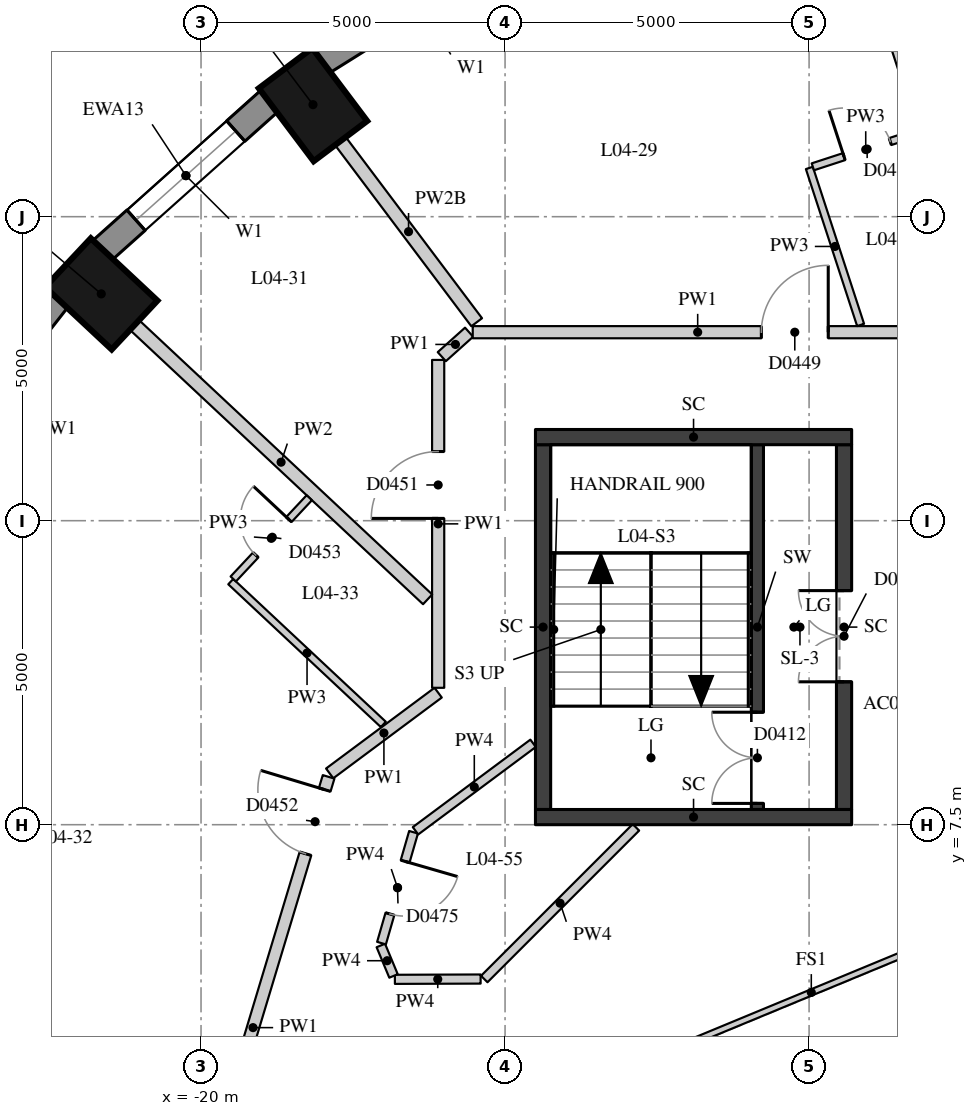
"""IFC4 building model, lengths in metres.
Left out: names, types, materials, properties, quantities, classifications, styles, units other than length and angle.
Written with IfcOpenShell. Run it as: python <this file> out.ifc"""

import sys

from ifc_helpers import new_model, si_unit, direction, frame, frame_2d, origin, origin_2d, place, context, subcontext, project, spatial, rectangle, extrude, element, fill, save


model = new_model("IFC4")
c1 = context("Model", 3, precision=1e-05, world=origin(), true_north=direction((0.0, 1.0)))
c2 = subcontext(c1, "Body", "Model", "MODEL_VIEW")
j1 = project(units=[si_unit("LENGTHUNIT", "METRE"), si_unit("PLANEANGLEUNIT", "RADIAN")], contexts=[c1])
p1 = place(None, origin())
s1 = spatial("IfcSite", under=j1, at=p1, CompositionType="ELEMENT")
p2 = place(p1, origin())
s2 = spatial("IfcBuilding", under=s1, at=p2, CompositionType="ELEMENT")
p3 = place(p2, frame((0.0, 0.0, 21.7)))
s3 = spatial("IfcBuildingStorey", under=s2, at=p3, CompositionType="ELEMENT", Elevation=21.7)
for number, where, z_axis, x_axis in (
    (1, (-18.159, 19.343, 0.0), (0.0, 0.0, 1.0), (-0.601, 0.799, 0.0)),
    (2, (-21.641, 16.23, 0.0), (0.0, 0.0, 1.0), (-0.73, 0.683, 0.0)),
):
    element("IfcColumn", number, at=place(p3, frame(where, z_axis=z_axis, x_axis=x_axis)), inside=s3, PredefinedType="COLUMN", context=c2, shape_type="SweptSolid", body=[
        extrude(rectangle(XDim=1.5, YDim=1.1, at=origin_2d()), origin(), (0.0, 0.0, 1.0), 3.3),
    ])
p4 = place(p3, frame((-14.817, 22.051, 0.0), z_axis=(0.0, 0.0, 1.0), x_axis=(-0.847635480093, -0.530579016629, 0.0)))
e3 = element("IfcWall", 3, at=p4, inside=s3, PredefinedType="SOLIDWALL", context=c2, shape_type="SweptSolid", body=[
    extrude(rectangle(XDim=3.782, YDim=0.45, at=frame_2d((1.891, 0.0))), origin(), (0.0, 0.0, 1.0), 3.02),
])
p5 = place(p4, frame((0.791, 0.0, 0.4)))
e4 = element("IfcOpeningElement", 4, at=p5, cuts=e3, PredefinedType="OPENING", context=c2, shape_type="SweptSolid", body=[
    extrude(rectangle(XDim=2.2, YDim=1.75, at=frame_2d((1.1, 0.875))), frame((0.0, 0.235, 0.0), z_axis=(0.0, -1.0, 0.0), x_axis=(1.0, 0.0, 0.0)), (0.0, 0.0, 1.0), 0.47),
])
p6 = place(p3, frame((-18.871, 19.407, 0.0), z_axis=(0.0, 0.0, 1.0), x_axis=(-0.745526233716, -0.66647628228, 0.0)))
e5 = element("IfcWall", 5, at=p6, inside=s3, PredefinedType="SOLIDWALL", context=c2, shape_type="SweptSolid", body=[
    extrude(rectangle(XDim=3.697, YDim=0.45, at=frame_2d((1.848, 0.0))), origin(), (0.0, 0.0, 1.0), 3.02),
])
p7 = place(p6, frame((0.749, 0.0, 0.4)))
e6 = element("IfcOpeningElement", 6, at=p7, cuts=e5, PredefinedType="OPENING", context=c2, shape_type="SweptSolid", body=[
    extrude(rectangle(XDim=2.2, YDim=1.75, at=frame_2d((1.1, 0.875))), frame((0.0, 0.235, 0.0), z_axis=(0.0, -1.0, 0.0), x_axis=(1.0, 0.0, 0.0)), (0.0, 0.0, 1.0), 0.47),
])
p8 = place(p3, frame((-22.352, 16.17, 0.0), z_axis=(0.0, 0.0, 1.0), x_axis=(-0.616661975264, -0.787228053529, 0.0)))
e7 = element("IfcWall", 7, at=p8, inside=s3, PredefinedType="SOLIDWALL", context=c2, shape_type="SweptSolid", body=[
    extrude(rectangle(XDim=3.61, YDim=0.45, at=frame_2d((1.805, 0.0))), origin(), (0.0, 0.0, 1.0), 3.02),
])
p9 = place(p8, frame((0.705, 0.0, 0.4)))
e8 = element("IfcOpeningElement", 8, at=p9, cuts=e7, PredefinedType="OPENING", context=c2, shape_type="SweptSolid", body=[
    extrude(rectangle(XDim=2.2, YDim=1.75, at=frame_2d((1.1, 0.875))), frame((0.0, 0.235, 0.0), z_axis=(0.0, -1.0, 0.0), x_axis=(1.0, 0.0, 0.0)), (0.0, 0.0, 1.0), 0.47),
])
p10 = place(p3, frame((-10.85, 7.75, 0.0), z_axis=(0.0, 0.0, 1.0), x_axis=(0.0, 1.0, 0.0)))
e9 = element("IfcWall", 9, at=p10, inside=s3, PredefinedType="SHEAR", context=c2, shape_type="SweptSolid", body=[
    extrude(rectangle(XDim=6.0, YDim=0.2, at=frame_2d((3.0, 0.0))), origin(), (0.0, 0.0, 1.0), 3.02),
])
p11 = place(p10, frame((0.1, 0.0, 0.0)))
e10 = element("IfcOpeningElement", 10, at=p11, cuts=e9, PredefinedType="OPENING", context=c2, shape_type="SweptSolid", body=[
    extrude(rectangle(XDim=1.5, YDim=2.1, at=frame_2d((0.75, 1.05))), frame((0.0, 0.11, 0.0), z_axis=(0.0, -1.0, 0.0), x_axis=(1.0, 0.0, 0.0)), (0.0, 0.0, 1.0), 0.22),
])
p12 = place(p3, frame((-14.375, 7.75, -0.28), z_axis=(0.0, 0.0, 1.0), x_axis=(0.0, 1.0, 0.0)))
e11 = element("IfcWall", 11, at=p12, inside=s3, PredefinedType="SHEAR", context=c2, shape_type="SweptSolid", body=[
    extrude(rectangle(XDim=6.0, YDim=0.25, at=frame_2d((3.0, 0.0))), origin(), (0.0, 0.0, 1.0), 3.3),
])
p13 = place(p3, frame((-9.425, 7.75, -0.28), z_axis=(0.0, 0.0, 1.0), x_axis=(0.0, 1.0, 0.0)))
e12 = element("IfcWall", 12, at=p13, inside=s3, PredefinedType="SHEAR", context=c2, shape_type="SweptSolid", body=[
    extrude(rectangle(XDim=6.0, YDim=0.25, at=frame_2d((3.0, 0.0))), origin(), (0.0, 0.0, 1.0), 3.3),
])
p14 = place(p13, frame((2.1, 0.0, 0.28)))
e13 = element("IfcOpeningElement", 13, at=p14, cuts=e12, PredefinedType="OPENING", context=c2, shape_type="SweptSolid", body=[
    extrude(rectangle(XDim=1.5, YDim=2.1, at=frame_2d((0.75, 1.05))), frame((0.0, 0.135, 0.0), z_axis=(0.0, -1.0, 0.0), x_axis=(1.0, 0.0, 0.0)), (0.0, 0.0, 1.0), 0.27),
])
for number, where, z_axis, x_axis in (
    (14, (-14.5, 13.875, -0.28), (0.0, 0.0, 1.0), (1.0, 0.0, 0.0)),
    (15, (-14.5, 7.625, -0.28), (0.0, 0.0, 1.0), (1.0, 0.0, 0.0)),
):
    element("IfcWall", number, at=place(p3, frame(where, z_axis=z_axis, x_axis=x_axis)), inside=s3, PredefinedType="SHEAR", context=c2, shape_type="SweptSolid", body=[
        extrude(rectangle(XDim=5.2, YDim=0.25, at=frame_2d((2.6, 0.0))), origin(), (0.0, 0.0, 1.0), 3.3),
    ])
p15 = place(p3, frame((-17.884, 8.344, 0.0), z_axis=(0.0, 0.0, 1.0), x_axis=(0.802260120548, 0.596974621721, 0.0)))
e16 = element("IfcWall", 16, at=p15, inside=s3, PredefinedType="PARTITIONING", context=c2, shape_type="SweptSolid", body=[
    extrude(rectangle(XDim=2.224, YDim=0.2, at=frame_2d((1.112, 0.0))), origin(), (0.0, 0.0, 1.0), 3.02),
])
p16 = place(p3, frame((-16.1, 9.751, 0.0), z_axis=(0.0, 0.0, 1.0), x_axis=(0.0, 1.0, 0.0)))
e17 = element("IfcWall", 17, at=p16, inside=s3, PredefinedType="PARTITIONING", context=c2, shape_type="SweptSolid", body=[
    extrude(rectangle(XDim=5.393, YDim=0.2, at=frame_2d((2.696, 0.0))), origin(), (0.0, 0.0, 1.0), 3.02),
])
p17 = place(p16, frame((2.786, 0.0, 0.0)))
e18 = element("IfcOpeningElement", 18, at=p17, cuts=e17, PredefinedType="OPENING", context=c2, shape_type="SweptSolid", body=[
    extrude(rectangle(XDim=1.1, YDim=2.1, at=frame_2d((0.55, 1.05))), frame((0.0, 0.11, 0.0), z_axis=(0.0, -1.0, 0.0), x_axis=(1.0, 0.0, 0.0)), (0.0, 0.0, 1.0), 0.22),
])
p18 = place(p3, frame((-16.041, 15.198, 0.0), z_axis=(0.0, 0.0, 1.0), x_axis=(0.744722115519, 0.667374685359, 0.0)))
e19 = element("IfcWall", 19, at=p18, inside=s3, PredefinedType="PARTITIONING", context=c2, shape_type="SweptSolid", body=[
    extrude(rectangle(XDim=0.603, YDim=0.2, at=frame_2d((0.301, 0.0))), origin(), (0.0, 0.0, 1.0), 3.02),
])
p19 = place(p3, frame((-15.531, 15.6, 0.0), z_axis=(0.0, 0.0, 1.0), x_axis=(1.0, 0.0, 0.0)))
e20 = element("IfcWall", 20, at=p19, inside=s3, PredefinedType="PARTITIONING", context=c2, shape_type="SweptSolid", body=[
    extrude(rectangle(XDim=7.399, YDim=0.2, at=frame_2d((3.699, 0.0))), origin(), (0.0, 0.0, 1.0), 3.02),
])
p20 = place(p19, frame((4.747, 0.0, 0.0)))
e21 = element("IfcOpeningElement", 21, at=p20, cuts=e20, PredefinedType="OPENING", context=c2, shape_type="SweptSolid", body=[
    extrude(rectangle(XDim=1.1, YDim=2.1, at=frame_2d((0.55, 1.05))), frame((0.0, 0.11, 0.0), z_axis=(0.0, -1.0, 0.0), x_axis=(1.0, 0.0, 0.0)), (0.0, 0.0, 1.0), 0.22),
])
p21 = place(p3, frame((-20.388, 0.038, 0.0), z_axis=(0.0, 0.0, 1.0), x_axis=(0.288600779805, 0.957449523419, 0.0)))
e22 = element("IfcWall", 22, at=p21, inside=s3, PredefinedType="PARTITIONING", context=c2, shape_type="SweptSolid", body=[
    extrude(rectangle(XDim=8.615, YDim=0.2, at=frame_2d((4.308, 0.0))), origin(), (0.0, 0.0, 1.0), 3.02),
])
p22 = place(p21, frame((7.295, 0.0, 0.0)))
e23 = element("IfcOpeningElement", 23, at=p22, cuts=e22, PredefinedType="OPENING", context=c2, shape_type="SweptSolid", body=[
    extrude(rectangle(XDim=1.1, YDim=2.1, at=frame_2d((0.55, 1.05))), frame((0.0, 0.11, 0.0), z_axis=(0.0, -1.0, 0.0), x_axis=(1.0, 0.0, 0.0)), (0.0, 0.0, 1.0), 0.22),
])
p23 = place(p21, frame((0.22, 0.0, 0.0)))
e24 = element("IfcOpeningElement", 24, at=p23, cuts=e22, PredefinedType="OPENING", context=c2, shape_type="SweptSolid", body=[
    extrude(rectangle(XDim=1.1, YDim=2.1, at=frame_2d((0.55, 1.05))), frame((0.0, 0.11, 0.0), z_axis=(0.0, -1.0, 0.0), x_axis=(1.0, 0.0, 0.0)), (0.0, 0.0, 1.0), 0.22),
])
p24 = place(p3, frame((-12.847, 7.456, 0.0), z_axis=(0.0, 0.0, 1.0), x_axis=(-0.707072180997, -0.707141379683, 0.0)))
e25 = element("IfcWall", 25, at=p24, inside=s3, PredefinedType="PARTITIONING", context=c2, shape_type="SweptSolid", body=[
    extrude(rectangle(XDim=3.528, YDim=0.15, at=frame_2d((1.764, 0.0))), origin(), (0.0, 0.0, 1.0), 3.02),
])
p25 = place(p3, frame((-15.402, 4.961, 0.0), z_axis=(0.0, 0.0, 1.0), x_axis=(-0.999994001087, -0.003463782477, 0.0)))
e26 = element("IfcWall", 26, at=p25, inside=s3, PredefinedType="PARTITIONING", context=c2, shape_type="SweptSolid", body=[
    extrude(rectangle(XDim=1.41, YDim=0.15, at=frame_2d((0.705, 0.0))), origin(), (0.0, 0.0, 1.0), 3.02),
])
p26 = place(p3, frame((-16.834, 5.012, 0.0), z_axis=(0.0, 0.0, 1.0), x_axis=(-0.384455737739, 0.923143426408, 0.0)))
e27 = element("IfcWall", 27, at=p26, inside=s3, PredefinedType="PARTITIONING", context=c2, shape_type="SweptSolid", body=[
    extrude(rectangle(XDim=0.543, YDim=0.15, at=frame_2d((0.271, 0.0))), origin(), (0.0, 0.0, 1.0), 3.02),
])
p27 = place(p3, frame((-17.032, 5.552, 0.0), z_axis=(0.0, 0.0, 1.0), x_axis=(0.277658349549, 0.96067988473, 0.0)))
e28 = element("IfcWall", 28, at=p27, inside=s3, PredefinedType="PARTITIONING", context=c2, shape_type="SweptSolid", body=[
    extrude(rectangle(XDim=1.898, YDim=0.15, at=frame_2d((0.949, 0.0))), origin(), (0.0, 0.0, 1.0), 3.02),
])
p28 = place(p27, frame((0.499, 0.0, 0.0)))
e29 = element("IfcOpeningElement", 29, at=p28, cuts=e28, PredefinedType="OPENING", context=c2, shape_type="SweptSolid", body=[
    extrude(rectangle(XDim=0.9, YDim=2.1, at=frame_2d((0.45, 1.05))), frame((0.0, 0.085, 0.0), z_axis=(0.0, -1.0, 0.0), x_axis=(1.0, 0.0, 0.0)), (0.0, 0.0, 1.0), 0.17),
])
p29 = place(p3, frame((-16.473, 7.4, 0.0), z_axis=(0.0, 0.0, 1.0), x_axis=(0.802267063429, 0.596965291233, 0.0)))
e30 = element("IfcWall", 30, at=p29, inside=s3, PredefinedType="PARTITIONING", context=c2, shape_type="SweptSolid", body=[
    extrude(rectangle(XDim=2.41, YDim=0.15, at=frame_2d((1.205, 0.0))), origin(), (0.0, 0.0, 1.0), 3.02),
])
p30 = place(p3, frame((-9.429, 23.014, 0.0), z_axis=(0.0, 0.0, 1.0), x_axis=(0.310239117306, -0.950658555998, 0.0)))
e31 = element("IfcWall", 31, at=p30, inside=s3, PredefinedType="PARTITIONING", context=c2, shape_type="SweptSolid", body=[
    extrude(rectangle(XDim=7.003, YDim=0.22, at=frame_2d((3.501, 0.0))), origin(), (0.0, 0.0, 1.0), 3.02),
])
p31 = place(p3, frame((-17.708, 18.743, 0.0), z_axis=(0.0, 0.0, 1.0), x_axis=(0.601172757903, -0.799119086967, 0.0)))
e32 = element("IfcWall", 32, at=p31, inside=s3, PredefinedType="PARTITIONING", context=c2, shape_type="SweptSolid", body=[
    extrude(rectangle(XDim=3.729, YDim=0.22, at=frame_2d((1.864, 0.0))), origin(), (0.0, 0.0, 1.0), 2.57),
])
p32 = place(p3, frame((-21.093, 15.718, 0.0), z_axis=(0.0, 0.0, 1.0), x_axis=(0.73009284205, -0.683347965525, 0.0)))
e33 = element("IfcWall", 33, at=p32, inside=s3, PredefinedType="PARTITIONING", context=c2, shape_type="SweptSolid", body=[
    extrude(rectangle(XDim=6.602, YDim=0.22, at=frame_2d((3.301, 0.0))), origin(), (0.0, 0.0, 1.0), 3.02),
])
p33 = place(p3, frame((-25.761, 3.964, 0.0), z_axis=(0.0, 0.0, 1.0), x_axis=(0.981209888948, -0.192943395406, 0.0)))
e34 = element("IfcWall", 34, at=p33, inside=s3, PredefinedType="PARTITIONING", context=c2, shape_type="SweptSolid", body=[
    extrude(rectangle(XDim=6.188, YDim=0.22, at=frame_2d((3.094, 0.0))), origin(), (0.0, 0.0, 1.0), 2.47),
])
p34 = place(p3, frame((-9.153, 15.719, 0.0), z_axis=(0.0, 0.0, 1.0), x_axis=(-0.310236037509, 0.950659561058, 0.0)))
e35 = element("IfcWall", 35, at=p34, inside=s3, PredefinedType="PARTITIONING", context=c2, shape_type="SweptSolid", body=[
    extrude(rectangle(XDim=2.717, YDim=0.12, at=frame_2d((1.358, 0.0))), origin(), (0.0, 0.0, 1.0), 3.02),
])
p35 = place(p3, frame((-17.002, 9.149, 0.0), z_axis=(0.0, 0.0, 1.0), x_axis=(-0.730093035944, 0.683347758368, 0.0)))
e36 = element("IfcWall", 36, at=p35, inside=s3, PredefinedType="PARTITIONING", context=c2, shape_type="SweptSolid", body=[
    extrude(rectangle(XDim=3.437, YDim=0.12, at=frame_2d((1.718, 0.0))), origin(), (0.0, 0.0, 1.0), 3.02),
])
p36 = place(p3, frame((-9.938, 18.32, 0.0), z_axis=(0.0, 0.0, 1.0), x_axis=(0.950678536911, 0.31017788357, 0.0)))
e37 = element("IfcWall", 37, at=p36, inside=s3, PredefinedType="PARTITIONING", context=c2, shape_type="SweptSolid", body=[
    extrude(rectangle(XDim=1.83, YDim=0.12, at=frame_2d((0.915, 0.0))), origin(), (0.0, 0.0, 1.0), 3.02),
])
p37 = place(p36, frame((0.54, 0.0, 0.0)))
e38 = element("IfcOpeningElement", 38, at=p37, cuts=e37, PredefinedType="OPENING", context=c2, shape_type="SweptSolid", body=[
    extrude(rectangle(XDim=0.8, YDim=2.1, at=frame_2d((0.4, 1.05))), frame((0.0, 0.07, 0.0), z_axis=(0.0, -1.0, 0.0), x_axis=(1.0, 0.0, 0.0)), (0.0, 0.0, 1.0), 0.14),
])
p38 = place(p3, frame((-19.47, 11.542, 0.0), z_axis=(0.0, 0.0, 1.0), x_axis=(0.683306289544, 0.730131847456, 0.0)))
e39 = element("IfcWall", 39, at=p38, inside=s3, PredefinedType="PARTITIONING", context=c2, shape_type="SweptSolid", body=[
    extrude(rectangle(XDim=1.83, YDim=0.12, at=frame_2d((0.915, 0.0))), origin(), (0.0, 0.0, 1.0), 3.02),
])
p39 = place(p38, frame((0.54, 0.0, 0.0)))
e40 = element("IfcOpeningElement", 40, at=p39, cuts=e39, PredefinedType="OPENING", context=c2, shape_type="SweptSolid", body=[
    extrude(rectangle(XDim=0.8, YDim=2.1, at=frame_2d((0.4, 1.05))), frame((0.0, 0.07, 0.0), z_axis=(0.0, -1.0, 0.0), x_axis=(1.0, 0.0, 0.0)), (0.0, 0.0, 1.0), 0.14),
])
p40 = place(p3, frame((-11.927, 3.927, 0.0), z_axis=(0.0, 0.0, 1.0), x_axis=(0.923860025149, 0.382730523909, 0.0)))
e41 = element("IfcWall", 41, at=p40, inside=s3, PredefinedType="PARTITIONING", context=c2, shape_type="SweptSolid", body=[
    extrude(rectangle(XDim=4.251, YDim=0.1, at=frame_2d((2.125, 0.0))), origin(), (0.0, 0.0, 1.0), 3.02),
])
p41 = place(p7, origin())
e42 = element("IfcWindow", 42, at=p41, inside=s3, PartitioningType="SINGLE_PANEL", PredefinedType="WINDOW", context=c2, shape_type="SweptSolid", body=[
    extrude(rectangle(XDim=2.2, YDim=1.75, at=frame_2d((1.1, 0.875))), frame((0.0, 0.035, 0.0), z_axis=(0.0, -1.0, 0.0), x_axis=(1.0, 0.0, 0.0)), (0.0, 0.0, 1.0), 0.06),
])
fill(e6, e42)
p42 = place(p11, origin())
e43 = element("IfcDoor", 43, at=p42, inside=s3, OperationType="DOUBLE_DOOR_SINGLE_SWING", PredefinedType="DOOR", context=c2, shape_type="SweptSolid", body=[
    extrude(rectangle(XDim=1.5, YDim=2.1, at=frame_2d((0.75, 1.05))), frame((0.0, 0.025, 0.0), z_axis=(0.0, -1.0, 0.0), x_axis=(1.0, 0.0, 0.0)), (0.0, 0.0, 1.0), 0.05),
])
fill(e10, e43)
p43 = place(p14, origin())
e44 = element("IfcDoor", 44, at=p43, inside=s3, OperationType="DOUBLE_DOOR_SINGLE_SWING", PredefinedType="DOOR", context=c2, shape_type="SweptSolid", body=[
    extrude(rectangle(XDim=1.5, YDim=2.1, at=frame_2d((0.75, 1.05))), frame((0.0, 0.025, 0.0), z_axis=(0.0, -1.0, 0.0), x_axis=(1.0, 0.0, 0.0)), (0.0, 0.0, 1.0), 0.05),
])
fill(e13, e44)
p44 = place(p20, origin())
e45 = element("IfcDoor", 45, at=p44, inside=s3, OperationType="SINGLE_SWING_RIGHT", PredefinedType="DOOR", context=c2, shape_type="SweptSolid", body=[
    extrude(rectangle(XDim=1.1, YDim=2.1, at=frame_2d((0.55, 1.05))), frame((0.0, 0.025, 0.0), z_axis=(0.0, -1.0, 0.0), x_axis=(1.0, 0.0, 0.0)), (0.0, 0.0, 1.0), 0.05),
])
fill(e21, e45)
p45 = place(p37, origin())
e46 = element("IfcDoor", 46, at=p45, inside=s3, OperationType="SINGLE_SWING_LEFT", PredefinedType="DOOR", context=c2, shape_type="SweptSolid", body=[
    extrude(rectangle(XDim=0.8, YDim=2.1, at=frame_2d((0.4, 1.05))), frame((0.0, 0.025, 0.0), z_axis=(0.0, -1.0, 0.0), x_axis=(1.0, 0.0, 0.0)), (0.0, 0.0, 1.0), 0.05),
])
fill(e38, e46)
p46 = place(p17, origin())
e47 = element("IfcDoor", 47, at=p46, inside=s3, OperationType="SINGLE_SWING_LEFT", PredefinedType="DOOR", context=c2, shape_type="SweptSolid", body=[
    extrude(rectangle(XDim=1.1, YDim=2.1, at=frame_2d((0.55, 1.05))), frame((0.0, 0.025, 0.0), z_axis=(0.0, -1.0, 0.0), x_axis=(1.0, 0.0, 0.0)), (0.0, 0.0, 1.0), 0.05),
])
fill(e18, e47)
p47 = place(p22, origin())
e48 = element("IfcDoor", 48, at=p47, inside=s3, OperationType="SINGLE_SWING_RIGHT", PredefinedType="DOOR", context=c2, shape_type="SweptSolid", body=[
    extrude(rectangle(XDim=1.1, YDim=2.1, at=frame_2d((0.55, 1.05))), frame((0.0, 0.025, 0.0), z_axis=(0.0, -1.0, 0.0), x_axis=(1.0, 0.0, 0.0)), (0.0, 0.0, 1.0), 0.05),
])
fill(e23, e48)
p48 = place(p39, origin())
e49 = element("IfcDoor", 49, at=p48, inside=s3, OperationType="SINGLE_SWING_RIGHT", PredefinedType="DOOR", context=c2, shape_type="SweptSolid", body=[
    extrude(rectangle(XDim=0.8, YDim=2.1, at=frame_2d((0.4, 1.05))), frame((0.0, 0.025, 0.0), z_axis=(0.0, -1.0, 0.0), x_axis=(1.0, 0.0, 0.0)), (0.0, 0.0, 1.0), 0.05),
])
fill(e40, e49)
p49 = place(p28, origin())
e50 = element("IfcDoor", 50, at=p49, inside=s3, OperationType="SINGLE_SWING_LEFT", PredefinedType="DOOR", context=c2, shape_type="SweptSolid", body=[
    extrude(rectangle(XDim=0.9, YDim=2.1, at=frame_2d((0.45, 1.05))), frame((0.0, 0.025, 0.0), z_axis=(0.0, -1.0, 0.0), x_axis=(1.0, 0.0, 0.0)), (0.0, 0.0, 1.0), 0.05),
])
fill(e29, e50)
save(model, sys.argv[1])
